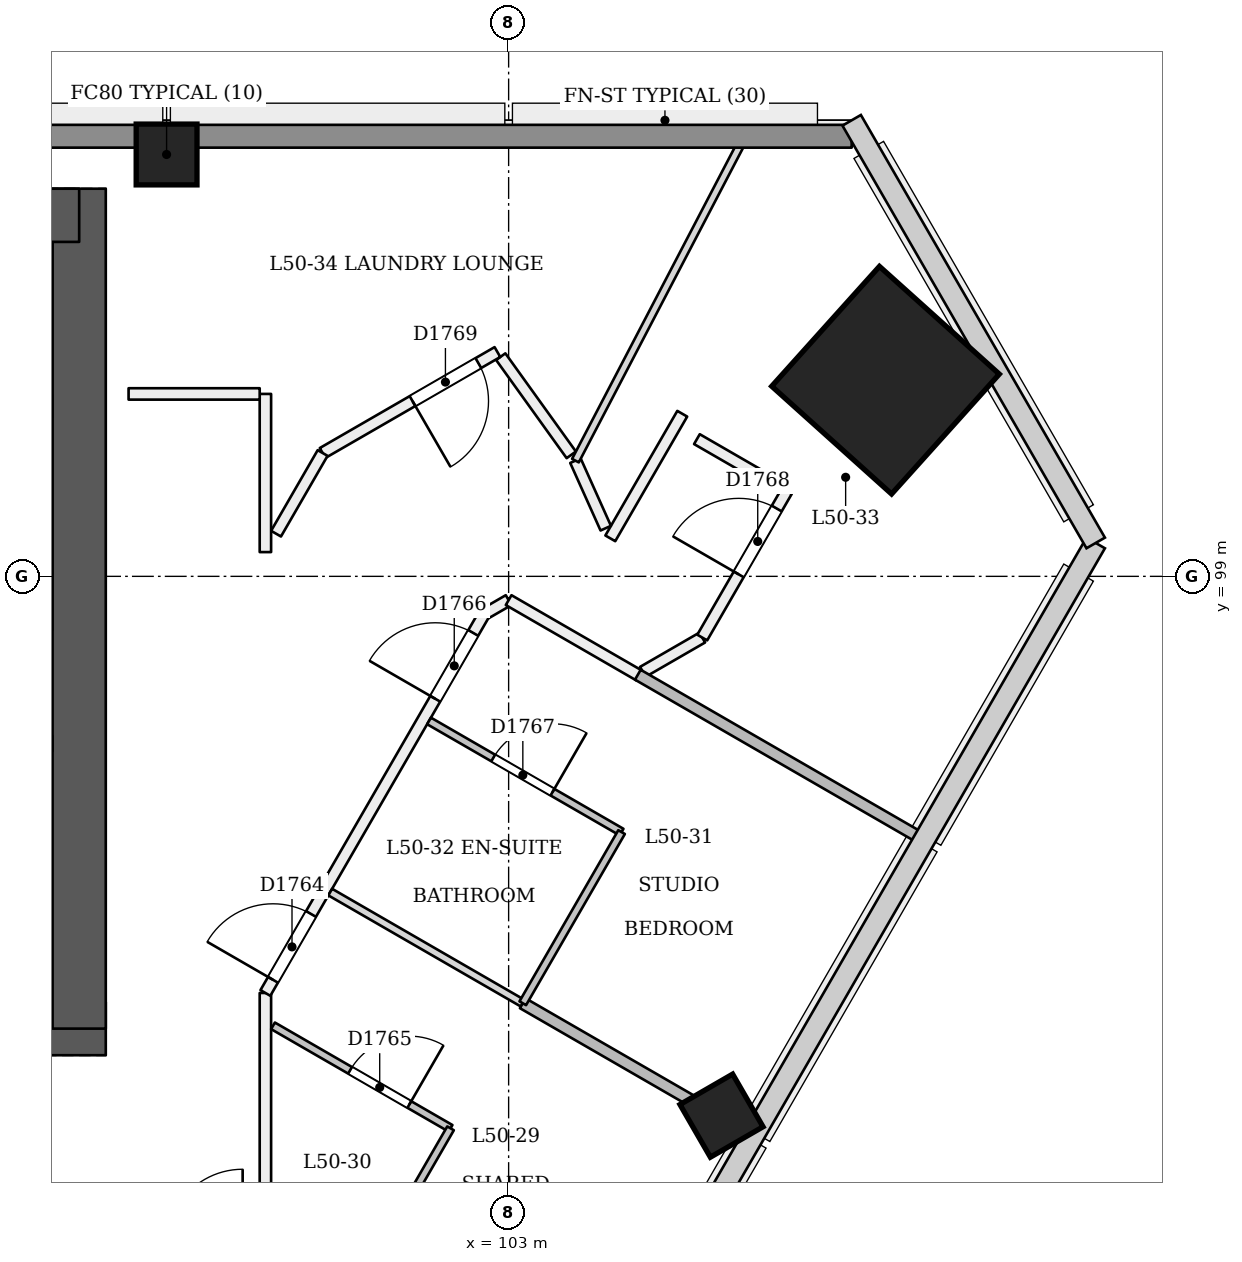
"""IFC4 building model, lengths in metres.
Left out: names, types, materials, properties, quantities, classifications, styles, units other than length and angle.
Written with IfcOpenShell. Run it as: python <this file> out.ifc"""

import sys

from ifc_helpers import new_model, si_unit, direction, frame, frame_2d, origin, origin_2d, place, context, subcontext, project, spatial, rectangle, extrude, element, fill, save


model = new_model("IFC4")
c1 = context("Model", 3, precision=1e-05, world=origin(), true_north=direction((0.0, 1.0)))
c2 = subcontext(c1, "Body", "Model", "MODEL_VIEW")
j1 = project(units=[si_unit("LENGTHUNIT", "METRE"), si_unit("PLANEANGLEUNIT", "RADIAN")], contexts=[c1])
p1 = place(None, origin())
s1 = spatial("IfcSite", under=j1, at=p1, CompositionType="ELEMENT")
p2 = place(p1, origin())
s2 = spatial("IfcBuilding", under=s1, at=p2, CompositionType="ELEMENT")
p3 = place(p2, frame((0.0, 0.0, 194.4)))
s3 = spatial("IfcBuildingStorey", under=s2, at=p3, CompositionType="ELEMENT", Elevation=194.4)
p4 = place(p3, frame((72.65, 93.05, 0.0), z_axis=(0.0, 0.0, 1.0), x_axis=(1.0, 0.0, 0.0)))
e1 = element("IfcWall", 1, at=p4, inside=s3, PredefinedType="SHEAR", context=c2, shape_type="SweptSolid", body=[
    extrude(rectangle(XDim=25.05, YDim=0.7, at=frame_2d((12.525, 0.0))), origin(), (0.0, 0.0, 1.0), 3.6),
])
p5 = place(p4, frame((1.15, 0.0, 0.0)))
e2 = element("IfcOpeningElement", 2, at=p5, cuts=e1, PredefinedType="OPENING", context=c2, shape_type="SweptSolid", body=[
    extrude(rectangle(XDim=1.2, YDim=2.1, at=frame_2d((0.6, 1.05))), frame((0.0, 0.36, 0.0), z_axis=(0.0, -1.0, 0.0), x_axis=(1.0, 0.0, 0.0)), (0.0, 0.0, 1.0), 0.721),
])
p6 = place(p4, frame((3.35, 0.0, 0.0)))
e3 = element("IfcOpeningElement", 3, at=p6, cuts=e1, PredefinedType="OPENING", context=c2, shape_type="SweptSolid", body=[
    extrude(rectangle(XDim=1.2, YDim=2.1, at=frame_2d((0.6, 1.05))), frame((0.0, 0.36, 0.0), z_axis=(0.0, -1.0, 0.0), x_axis=(1.0, 0.0, 0.0)), (0.0, 0.0, 1.0), 0.721),
])
p7 = place(p4, frame((13.35, 0.0, 0.0)))
e4 = element("IfcOpeningElement", 4, at=p7, cuts=e1, PredefinedType="OPENING", context=c2, shape_type="SweptSolid", body=[
    extrude(rectangle(XDim=1.2, YDim=2.1, at=frame_2d((0.6, 1.05))), frame((0.0, 0.36, 0.0), z_axis=(0.0, -1.0, 0.0), x_axis=(1.0, 0.0, 0.0)), (0.0, 0.0, 1.0), 0.721),
])
p8 = place(p4, frame((16.212, 0.0, 0.0)))
e5 = element("IfcOpeningElement", 5, at=p8, cuts=e1, PredefinedType="OPENING", context=c2, shape_type="SweptSolid", body=[
    extrude(rectangle(XDim=1.0, YDim=2.1, at=frame_2d((0.5, 1.05))), frame((0.0, 0.36, 0.0), z_axis=(0.0, -1.0, 0.0), x_axis=(1.0, 0.0, 0.0)), (0.0, 0.0, 1.0), 0.721),
])
p9 = place(p4, frame((19.65, 0.0, 0.0)))
e6 = element("IfcOpeningElement", 6, at=p9, cuts=e1, PredefinedType="OPENING", context=c2, shape_type="SweptSolid", body=[
    extrude(rectangle(XDim=1.0, YDim=2.1, at=frame_2d((0.5, 1.05))), frame((0.0, 0.36, 0.0), z_axis=(0.0, -1.0, 0.0), x_axis=(1.0, 0.0, 0.0)), (0.0, 0.0, 1.0), 0.721),
])
p10 = place(p4, frame((22.637, 0.0, 0.0)))
e7 = element("IfcOpeningElement", 7, at=p10, cuts=e1, PredefinedType="OPENING", context=c2, shape_type="SweptSolid", body=[
    extrude(rectangle(XDim=1.0, YDim=2.1, at=frame_2d((0.5, 1.05))), frame((0.0, 0.36, 0.0), z_axis=(0.0, -1.0, 0.0), x_axis=(1.0, 0.0, 0.0)), (0.0, 0.0, 1.0), 0.721),
])
p11 = place(p3, frame((97.35, 93.05, 0.0), z_axis=(0.0, 0.0, 1.0), x_axis=(0.0, 1.0, 0.0)))
e8 = element("IfcWall", 8, at=p11, inside=s3, PredefinedType="SHEAR", context=c2, shape_type="SweptSolid", body=[
    extrude(rectangle(XDim=11.05, YDim=0.7, at=frame_2d((5.525, 0.0))), origin(), (0.0, 0.0, 1.0), 3.6),
])
p12 = place(p3, frame((97.35, 103.75, 0.0), z_axis=(0.0, 0.0, 1.0), x_axis=(-1.0, 0.0, 0.0)))
e9 = element("IfcWall", 9, at=p12, inside=s3, PredefinedType="SHEAR", context=c2, shape_type="SweptSolid", body=[
    extrude(rectangle(XDim=25.05, YDim=0.7, at=frame_2d((12.525, 0.0))), origin(), (0.0, 0.0, 1.0), 3.6),
])
p13 = place(p3, frame((107.992, 101.57, 0.0), z_axis=(-0.028334066552, 0.009286524205, 0.999555371723), x_axis=(0.498275389395, -0.866735148496, 0.022176985495)))
e10 = element("IfcColumn", 10, at=p13, inside=s3, PredefinedType="COLUMN", context=c2, shape_type="SweptSolid", body=[
    extrude(rectangle(XDim=2.12, YDim=2.12, at=origin_2d()), origin(), (0.0, 0.0, 1.0), 3.602),
])
p14 = place(p3, frame((98.5, 104.55, 0.0), z_axis=(0.0, 0.0, 1.0), x_axis=(1.0, 0.0, 0.0)))
e11 = element("IfcColumn", 11, at=p14, inside=s3, PredefinedType="COLUMN", context=c2, shape_type="SweptSolid", body=[
    extrude(rectangle(XDim=0.8, YDim=0.8, at=origin_2d()), origin(), (0.0, 0.0, 1.0), 3.6),
])
p15 = place(p3, frame((105.827, 91.859, 0.0), z_axis=(-0.022235136645, 0.038468150514, 0.999012412383), x_axis=(-0.499817940976, -0.865845528857, 0.022215896055)))
e12 = element("IfcColumn", 12, at=p15, inside=s3, PredefinedType="COLUMN", context=c2, shape_type="SweptSolid", body=[
    extrude(rectangle(XDim=0.8, YDim=0.8, at=origin_2d()), origin(), (0.0, 0.0, 1.0), 3.579),
])
p16 = place(p3, frame((99.8, 90.18, 0.0), z_axis=(0.0, 0.0, 1.0), x_axis=(0.0, 1.0, 0.0)))
e13 = element("IfcWall", 13, at=p16, inside=s3, PredefinedType="PARTITIONING", context=c2, shape_type="SweptSolid", body=[
    extrude(rectangle(XDim=3.339, YDim=0.15, at=frame_2d((1.669, 0.0))), origin(), (0.0, 0.0, 1.0), 3.15),
])
p17 = place(p3, frame((102.676, 98.5, 0.0), z_axis=(0.0, 0.0, 1.0), x_axis=(0.865946660792, 0.500136362069, 0.0)))
e14 = element("IfcWall", 14, at=p17, inside=s3, PredefinedType="PARTITIONING", context=c2, shape_type="SweptSolid", body=[
    extrude(rectangle(XDim=0.375, YDim=0.15, at=frame_2d((0.187, 0.0))), origin(), (0.0, 0.0, 1.0), 3.15),
])
p18 = place(p3, frame((103.0, 98.687, 0.0), z_axis=(0.0, 0.0, 1.0), x_axis=(0.865995203459, -0.50005230485, 0.0)))
e15 = element("IfcWall", 15, at=p18, inside=s3, PredefinedType="PARTITIONING", context=c2, shape_type="SweptSolid", body=[
    extrude(rectangle(XDim=1.986, YDim=0.15, at=frame_2d((0.993, 0.0))), origin(), (0.0, 0.0, 1.0), 3.15),
])
p19 = place(p3, frame((99.8, 93.519, 0.0), z_axis=(0.0, 0.0, 1.0), x_axis=(0.499996810272, 0.866027245367, 0.0)))
e16 = element("IfcWall", 16, at=p19, inside=s3, PredefinedType="PARTITIONING", context=c2, shape_type="SweptSolid", body=[
    extrude(rectangle(XDim=5.751, YDim=0.15, at=frame_2d((2.876, 0.0))), origin(), (0.0, 0.0, 1.0), 3.15),
])
p20 = place(p19, frame((0.2, 0.0, 0.0)))
e17 = element("IfcOpeningElement", 17, at=p20, cuts=e16, PredefinedType="OPENING", context=c2, shape_type="SweptSolid", body=[
    extrude(rectangle(XDim=1.0, YDim=2.1, at=frame_2d((0.5, 1.05))), frame((0.0, 0.085, 0.0), z_axis=(0.0, -1.0, 0.0), x_axis=(1.0, 0.0, 0.0)), (0.0, 0.0, 1.0), 0.171),
])
p21 = place(p19, frame((4.469, 0.0, 0.0)))
e18 = element("IfcOpeningElement", 18, at=p21, cuts=e16, PredefinedType="OPENING", context=c2, shape_type="SweptSolid", body=[
    extrude(rectangle(XDim=1.0, YDim=2.1, at=frame_2d((0.5, 1.05))), frame((0.0, 0.085, 0.0), z_axis=(0.0, -1.0, 0.0), x_axis=(1.0, 0.0, 0.0)), (0.0, 0.0, 1.0), 0.171),
])
p22 = place(p3, frame((104.766, 97.744, 0.0), z_axis=(0.0, 0.0, 1.0), x_axis=(0.865951076121, 0.500128717197, 0.0)))
e19 = element("IfcWall", 19, at=p22, inside=s3, PredefinedType="PARTITIONING", context=c2, shape_type="SweptSolid", body=[
    extrude(rectangle(XDim=0.902, YDim=0.15, at=frame_2d((0.451, 0.0))), origin(), (0.0, 0.0, 1.0), 3.15),
])
p23 = place(p3, frame((105.547, 98.195, 0.0), z_axis=(0.0, 0.0, 1.0), x_axis=(0.499985160367, 0.866033971281, 0.0)))
e20 = element("IfcWall", 20, at=p23, inside=s3, PredefinedType="PARTITIONING", context=c2, shape_type="SweptSolid", body=[
    extrude(rectangle(XDim=2.226, YDim=0.15, at=frame_2d((1.113, 0.0))), origin(), (0.0, 0.0, 1.0), 3.15),
])
p24 = place(p23, frame((0.96, 0.0, 0.0)))
e21 = element("IfcOpeningElement", 21, at=p24, cuts=e20, PredefinedType="OPENING", context=c2, shape_type="SweptSolid", body=[
    extrude(rectangle(XDim=1.0, YDim=2.1, at=frame_2d((0.5, 1.05))), frame((0.0, 0.085, 0.0), z_axis=(0.0, -1.0, 0.0), x_axis=(1.0, 0.0, 0.0)), (0.0, 0.0, 1.0), 0.171),
])
p25 = place(p3, frame((106.595, 100.16, 0.0), z_axis=(0.0, 0.0, 1.0), x_axis=(-0.865999760466, 0.500044412901, 0.0)))
e22 = element("IfcWall", 22, at=p25, inside=s3, PredefinedType="PARTITIONING", context=c2, shape_type="SweptSolid", body=[
    extrude(rectangle(XDim=1.291, YDim=0.15, at=frame_2d((0.646, 0.0))), origin(), (0.0, 0.0, 1.0), 3.15),
])
p26 = place(p3, frame((105.284, 101.139, 0.0), z_axis=(0.0, 0.0, 1.0), x_axis=(-0.50000898992, -0.86602021339, 0.0)))
e23 = element("IfcWall", 23, at=p26, inside=s3, PredefinedType="PARTITIONING", context=c2, shape_type="SweptSolid", body=[
    extrude(rectangle(XDim=1.893, YDim=0.15, at=frame_2d((0.947, 0.0))), origin(), (0.0, 0.0, 1.0), 3.15),
])
p27 = place(p3, frame((104.278, 99.634, 0.0), z_axis=(0.0, 0.0, 1.0), x_axis=(-0.409322178259, 0.912389913571, 0.0)))
e24 = element("IfcWall", 24, at=p27, inside=s3, PredefinedType="PARTITIONING", context=c2, shape_type="SweptSolid", body=[
    extrude(rectangle(XDim=0.974, YDim=0.15, at=frame_2d((0.487, 0.0))), origin(), (0.0, 0.0, 1.0), 3.15),
])
p28 = place(p3, frame((103.824, 100.599, 0.0), z_axis=(0.0, 0.0, 1.0), x_axis=(-0.583515838317, 0.812101758669, 0.0)))
e25 = element("IfcWall", 25, at=p28, inside=s3, PredefinedType="PARTITIONING", context=c2, shape_type="SweptSolid", body=[
    extrude(rectangle(XDim=1.59, YDim=0.15, at=frame_2d((0.795, 0.0))), origin(), (0.0, 0.0, 1.0), 3.15),
])
p29 = place(p3, frame((102.853, 101.951, 0.0), z_axis=(0.0, 0.0, 1.0), x_axis=(-0.866034036823, -0.49998504684, 0.0)))
e26 = element("IfcWall", 26, at=p29, inside=s3, PredefinedType="PARTITIONING", context=c2, shape_type="SweptSolid", body=[
    extrude(rectangle(XDim=2.656, YDim=0.15, at=frame_2d((1.328, 0.0))), origin(), (0.0, 0.0, 1.0), 3.15),
])
p30 = place(p29, frame((0.29, 0.0, 0.0)))
e27 = element("IfcOpeningElement", 27, at=p30, cuts=e26, PredefinedType="OPENING", context=c2, shape_type="SweptSolid", body=[
    extrude(rectangle(XDim=1.0, YDim=2.1, at=frame_2d((0.5, 1.05))), frame((0.0, 0.085, 0.0), z_axis=(0.0, -1.0, 0.0), x_axis=(1.0, 0.0, 0.0)), (0.0, 0.0, 1.0), 0.171),
])
p31 = place(p3, frame((100.553, 100.623, 0.0), z_axis=(0.0, 0.0, 1.0), x_axis=(-0.499952348839, -0.866052913447, 0.0)))
e28 = element("IfcWall", 28, at=p31, inside=s3, PredefinedType="PARTITIONING", context=c2, shape_type="SweptSolid", body=[
    extrude(rectangle(XDim=1.226, YDim=0.15, at=frame_2d((0.613, 0.0))), origin(), (0.0, 0.0, 1.0), 3.15),
])
p32 = place(p3, frame((99.8, 99.319, 0.0), z_axis=(0.0, 0.0, 1.0), x_axis=(0.0, 1.0, 0.0)))
e29 = element("IfcWall", 29, at=p32, inside=s3, PredefinedType="PARTITIONING", context=c2, shape_type="SweptSolid", body=[
    extrude(rectangle(XDim=2.081, YDim=0.15, at=frame_2d((1.041, 0.0))), origin(), (0.0, 0.0, 1.0), 3.15),
])
p33 = place(p3, frame((99.725, 101.4, 0.0), z_axis=(0.0, 0.0, 1.0), x_axis=(-1.0, 0.0, 0.0)))
e30 = element("IfcWall", 30, at=p33, inside=s3, PredefinedType="PARTITIONING", context=c2, shape_type="SweptSolid", body=[
    extrude(rectangle(XDim=1.725, YDim=0.15, at=frame_2d((0.863, 0.0))), origin(), (0.0, 0.0, 1.0), 3.15),
])
p34 = place(p3, frame((99.9, 93.087, 0.0), z_axis=(0.0, 0.0, 1.0), x_axis=(0.866028828302, -0.499994068514, 0.0)))
e31 = element("IfcWall", 31, at=p34, inside=s3, PredefinedType="PARTITIONING", context=c2, shape_type="SweptSolid", body=[
    extrude(rectangle(XDim=2.697, YDim=0.1, at=frame_2d((1.349, 0.0))), origin(), (0.0, 0.0, 1.0), 3.15),
])
p35 = place(p34, frame((1.171, 0.0, 0.0)))
e32 = element("IfcOpeningElement", 32, at=p35, cuts=e31, PredefinedType="OPENING", context=c2, shape_type="SweptSolid", body=[
    extrude(rectangle(XDim=0.9, YDim=2.1, at=frame_2d((0.45, 1.05))), frame((0.0, 0.061, 0.0), z_axis=(0.0, -1.0, 0.0), x_axis=(1.0, 0.0, 0.0)), (0.0, 0.0, 1.0), 0.121),
])
p36 = place(p3, frame((102.236, 91.738, 0.0), z_axis=(0.0, 0.0, 1.0), x_axis=(-0.499936506574, -0.866062058628, 0.0)))
e33 = element("IfcWall", 33, at=p36, inside=s3, PredefinedType="PARTITIONING", context=c2, shape_type="SweptSolid", body=[
    extrude(rectangle(XDim=2.6, YDim=0.1, at=frame_2d((1.3, 0.0))), origin(), (0.0, 0.0, 1.0), 3.15),
])
p37 = place(p3, frame((106.13, 91.684, 0.0), z_axis=(0.0, 0.0, 1.0), x_axis=(-0.866020560687, 0.500008388397, 0.0)))
e34 = element("IfcWall", 34, at=p37, inside=s3, PredefinedType="PARTITIONING", context=c2, shape_type="SweptSolid", body=[
    extrude(rectangle(XDim=3.4, YDim=0.15, at=frame_2d((1.7, 0.0))), origin(), (0.0, 0.0, 1.0), 2.65),
])
p38 = place(p3, frame((103.186, 93.384, 0.0), z_axis=(0.0, 0.0, 1.0), x_axis=(-0.866046596414, 0.499963291492, 0.0)))
e35 = element("IfcWall", 35, at=p38, inside=s3, PredefinedType="PARTITIONING", context=c2, shape_type="SweptSolid", body=[
    extrude(rectangle(XDim=2.925, YDim=0.1, at=frame_2d((1.462, 0.0))), origin(), (0.0, 0.0, 1.0), 3.15),
])
p39 = place(p3, frame((101.953, 97.098, 0.0), z_axis=(0.0, 0.0, 1.0), x_axis=(0.866025730634, -0.499999433879, 0.0)))
e36 = element("IfcWall", 36, at=p39, inside=s3, PredefinedType="PARTITIONING", context=c2, shape_type="SweptSolid", body=[
    extrude(rectangle(XDim=2.925, YDim=0.1, at=frame_2d((1.462, 0.0))), origin(), (0.0, 0.0, 1.0), 3.15),
])
p40 = place(p39, frame((0.975, 0.0, 0.0)))
e37 = element("IfcOpeningElement", 37, at=p40, cuts=e36, PredefinedType="OPENING", context=c2, shape_type="SweptSolid", body=[
    extrude(rectangle(XDim=0.9, YDim=2.1, at=frame_2d((0.45, 1.05))), frame((0.0, 0.061, 0.0), z_axis=(0.0, -1.0, 0.0), x_axis=(1.0, 0.0, 0.0)), (0.0, 0.0, 1.0), 0.121),
])
p41 = place(p3, frame((104.486, 95.635, 0.0), z_axis=(0.0, 0.0, 1.0), x_axis=(-0.499936506574, -0.866062058628, 0.0)))
e38 = element("IfcWall", 38, at=p41, inside=s3, PredefinedType="PARTITIONING", context=c2, shape_type="SweptSolid", body=[
    extrude(rectangle(XDim=2.6, YDim=0.1, at=frame_2d((1.3, 0.0))), origin(), (0.0, 0.0, 1.0), 3.15),
])
p42 = place(p3, frame((108.398, 95.571, 0.0), z_axis=(0.0, 0.0, 1.0), x_axis=(-0.866028486751, 0.499994660107, 0.0)))
e39 = element("IfcWall", 39, at=p42, inside=s3, PredefinedType="PARTITIONING", context=c2, shape_type="SweptSolid", body=[
    extrude(rectangle(XDim=4.27, YDim=0.15, at=frame_2d((2.135, 0.0))), origin(), (0.0, 0.0, 1.0), 2.65),
])
p43 = place(p3, frame((106.165, 104.9, 0.0), z_axis=(0.0, 0.0, 1.0), x_axis=(-0.462924145424, -0.886397899131, 0.0)))
e40 = element("IfcWall", 40, at=p43, inside=s3, PredefinedType="PARTITIONING", context=c2, shape_type="SweptSolid", body=[
    extrude(rectangle(XDim=4.938, YDim=0.1, at=frame_2d((2.469, 0.0))), origin(), (0.0, 0.0, 1.0), 2.65),
])
p44 = place(p3, frame((62.487, 104.79, 0.0), z_axis=(0.0, 0.0, 1.0), x_axis=(1.0, 0.0, 0.0)))
e41 = element("IfcWall", 41, at=p44, inside=s3, PredefinedType="SOLIDWALL", context=c2, shape_type="SweptSolid", body=[
    extrude(rectangle(XDim=45.026, YDim=0.3, at=frame_2d((22.513, 0.0))), origin(), (0.0, 0.0, 1.0), 2.65),
])
p45 = place(p20, origin())
e42 = element("IfcDoor", 42, at=p45, inside=s3, OperationType="SINGLE_SWING_LEFT", PredefinedType="NOTDEFINED", context=c2, shape_type="SweptSolid", body=[
    extrude(rectangle(XDim=1.0, YDim=2.1, at=frame_2d((0.5, 1.05))), frame((0.0, 0.025, 0.0), z_axis=(0.0, -1.0, 0.0), x_axis=(1.0, 0.0, 0.0)), (0.0, 0.0, 1.0), 0.05),
])
fill(e17, e42)
p46 = place(p35, origin())
e43 = element("IfcDoor", 43, at=p46, inside=s3, OperationType="SINGLE_SWING_RIGHT", PredefinedType="NOTDEFINED", context=c2, shape_type="SweptSolid", body=[
    extrude(rectangle(XDim=0.9, YDim=2.1, at=frame_2d((0.45, 1.05))), frame((0.0, 0.025, 0.0), z_axis=(0.0, -1.0, 0.0), x_axis=(1.0, 0.0, 0.0)), (0.0, 0.0, 1.0), 0.05),
])
fill(e32, e43)
p47 = place(p21, origin())
e44 = element("IfcDoor", 44, at=p47, inside=s3, OperationType="SINGLE_SWING_LEFT", PredefinedType="NOTDEFINED", context=c2, shape_type="SweptSolid", body=[
    extrude(rectangle(XDim=1.0, YDim=2.1, at=frame_2d((0.5, 1.05))), frame((0.0, 0.025, 0.0), z_axis=(0.0, -1.0, 0.0), x_axis=(1.0, 0.0, 0.0)), (0.0, 0.0, 1.0), 0.05),
])
fill(e18, e44)
p48 = place(p40, origin())
e45 = element("IfcDoor", 45, at=p48, inside=s3, OperationType="SINGLE_SWING_RIGHT", PredefinedType="NOTDEFINED", context=c2, shape_type="SweptSolid", body=[
    extrude(rectangle(XDim=0.9, YDim=2.1, at=frame_2d((0.45, 1.05))), frame((0.0, 0.025, 0.0), z_axis=(0.0, -1.0, 0.0), x_axis=(1.0, 0.0, 0.0)), (0.0, 0.0, 1.0), 0.05),
])
fill(e37, e45)
p49 = place(p24, origin())
e46 = element("IfcDoor", 46, at=p49, inside=s3, OperationType="SINGLE_SWING_LEFT", PredefinedType="NOTDEFINED", context=c2, shape_type="SweptSolid", body=[
    extrude(rectangle(XDim=1.0, YDim=2.1, at=frame_2d((0.5, 1.05))), frame((0.0, 0.025, 0.0), z_axis=(0.0, -1.0, 0.0), x_axis=(1.0, 0.0, 0.0)), (0.0, 0.0, 1.0), 0.05),
])
fill(e21, e46)
p50 = place(p30, origin())
e47 = element("IfcDoor", 47, at=p50, inside=s3, OperationType="SINGLE_SWING_RIGHT", PredefinedType="NOTDEFINED", context=c2, shape_type="SweptSolid", body=[
    extrude(rectangle(XDim=1.0, YDim=2.1, at=frame_2d((0.5, 1.05))), frame((0.0, 0.025, 0.0), z_axis=(0.0, -1.0, 0.0), x_axis=(1.0, 0.0, 0.0)), (0.0, 0.0, 1.0), 0.05),
])
fill(e27, e47)
save(model, sys.argv[1])
